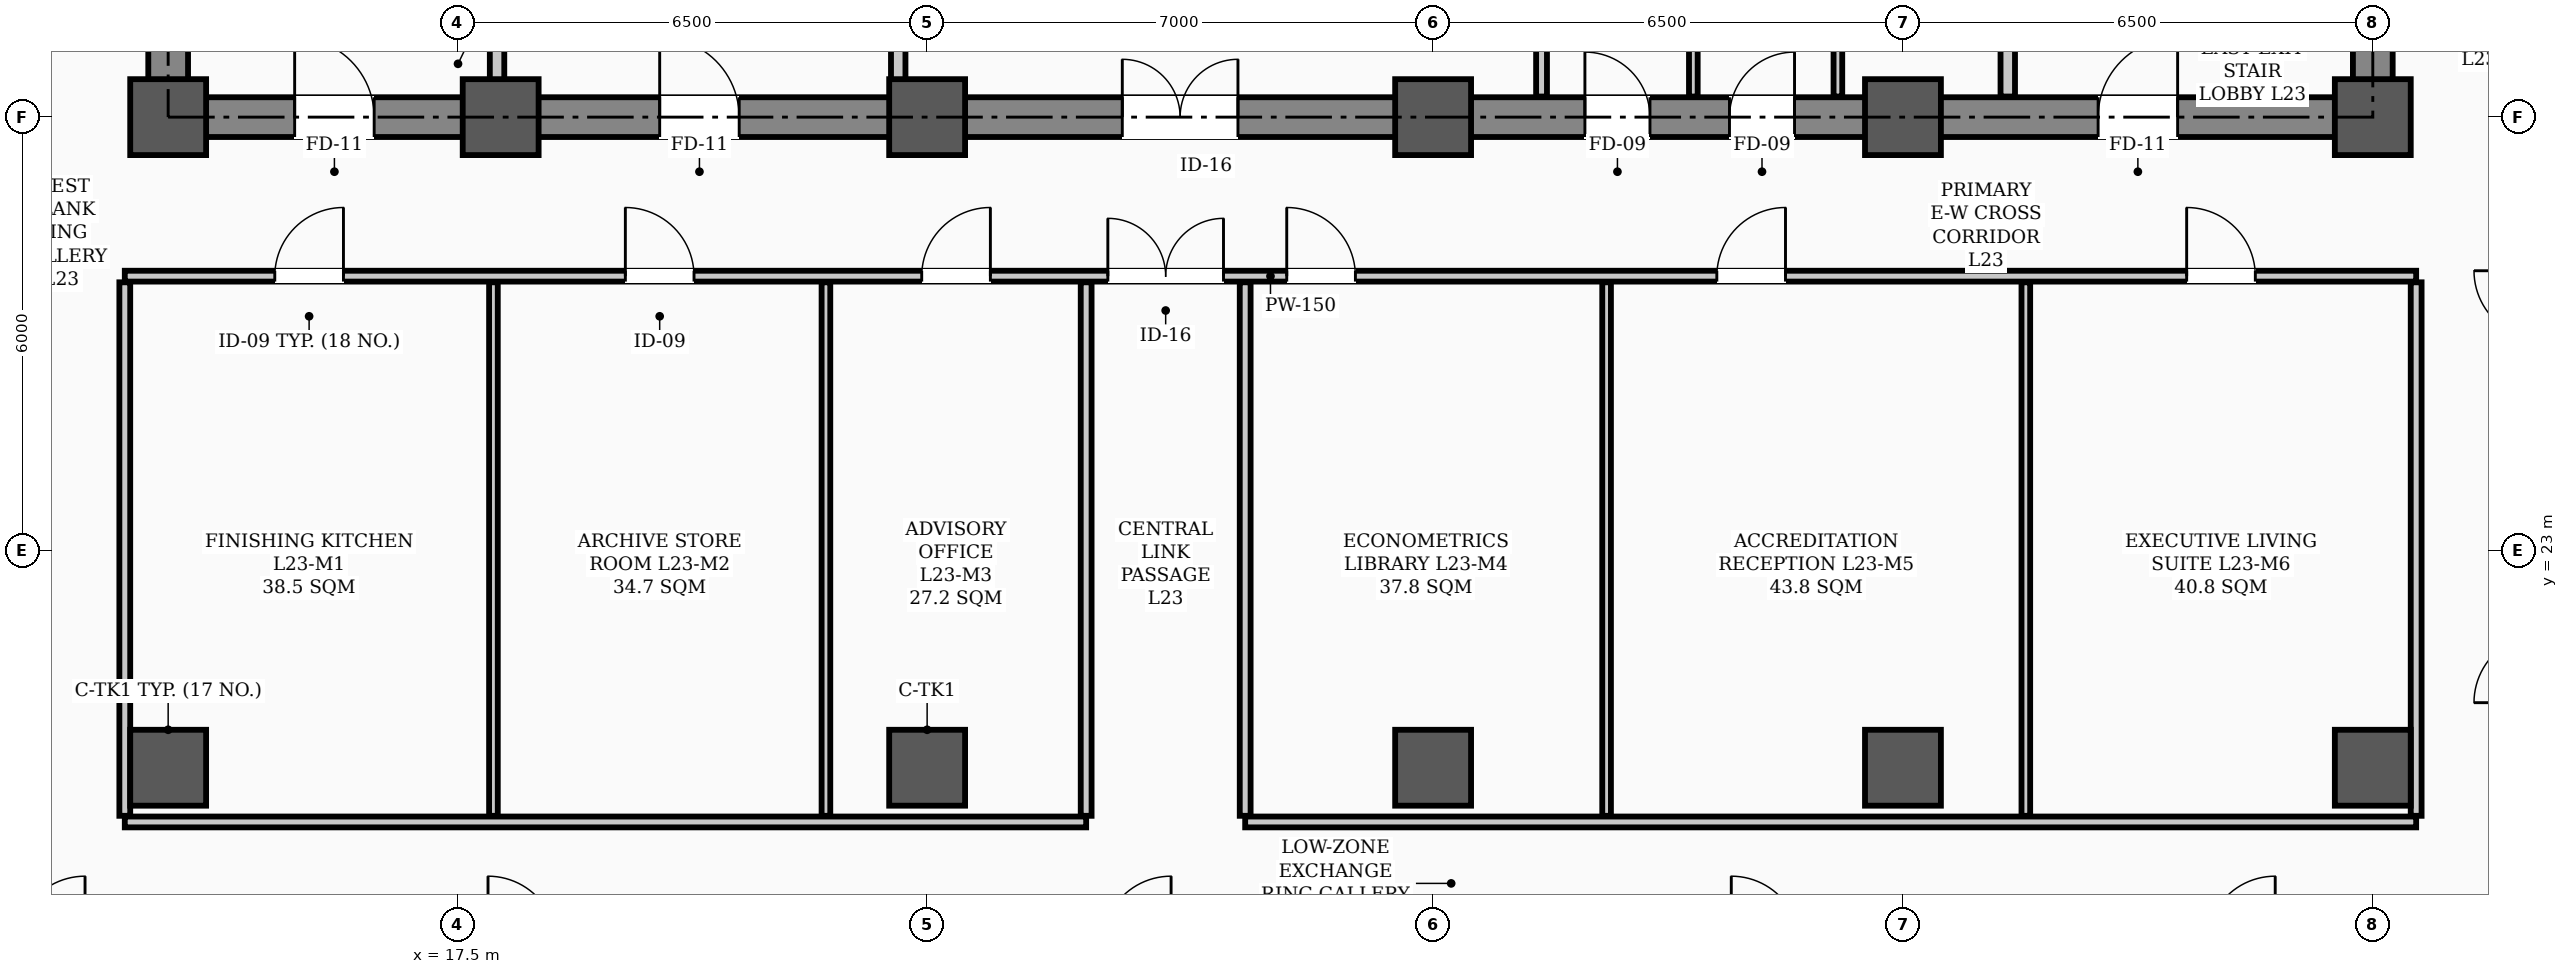
"""IFC4 building model, lengths in metres.
Left out: names, types, materials, properties, quantities, classifications, styles, units other than length and angle.
Written with IfcOpenShell. Run it as: python <this file> out.ifc"""

import sys

from ifc_helpers import new_model, si_unit, direction, frame, frame_2d, origin, origin_2d, place, context, subcontext, project, spatial, rectangle, hollow_rectangle, extrude, element, fill, save


model = new_model("IFC4")
c1 = context("Model", 3, precision=1e-05, world=origin(), true_north=direction((0.0, 1.0)))
c2 = subcontext(c1, "Body", "Model", "MODEL_VIEW")
j1 = project(units=[si_unit("LENGTHUNIT", "METRE"), si_unit("PLANEANGLEUNIT", "RADIAN")], contexts=[c1])
p1 = place(None, origin())
s1 = spatial("IfcSite", under=j1, at=p1, CompositionType="ELEMENT")
p2 = place(p1, origin())
s2 = spatial("IfcBuilding", under=s1, at=p2, CompositionType="ELEMENT")
p3 = place(p2, frame((0.0, 0.0, 92.8)))
s3 = spatial("IfcBuildingStorey", under=s2, at=p3, CompositionType="ELEMENT", Elevation=92.8)
for number, where, z_axis, x_axis in (
    (1, (13.5, 29.0, 0.0), (0.0, 0.0, 1.0), (1.0, 0.0, 0.0)),
    (2, (18.1, 29.0, 0.0), (0.0, 0.0, 1.0), (1.0, 0.0, 0.0)),
    (3, (24.0, 29.0, 0.0), (0.0, 0.0, 1.0), (1.0, 0.0, 0.0)),
    (4, (31.0, 29.0, 0.0), (0.0, 0.0, 1.0), (1.0, 0.0, 0.0)),
    (5, (37.5, 29.0, 0.0), (0.0, 0.0, 1.0), (1.0, 0.0, 0.0)),
    (6, (44.0, 29.0, 0.0), (0.0, 0.0, 1.0), (1.0, 0.0, 0.0)),
    (7, (13.5, 20.0, 0.0), (0.0, 0.0, 1.0), (1.0, 0.0, 0.0)),
    (8, (24.0, 20.0, 0.0), (0.0, 0.0, 1.0), (1.0, 0.0, 0.0)),
    (9, (31.0, 20.0, 0.0), (0.0, 0.0, 1.0), (1.0, 0.0, 0.0)),
    (10, (37.5, 20.0, 0.0), (0.0, 0.0, 1.0), (1.0, 0.0, 0.0)),
    (11, (44.0, 20.0, 0.0), (0.0, 0.0, 1.0), (1.0, 0.0, 0.0)),
):
    element("IfcColumn", number, at=place(p3, frame(where, z_axis=z_axis, x_axis=x_axis)), inside=s3, PredefinedType="COLUMN", context=c2, shape_type="SweptSolid", body=[
        extrude(hollow_rectangle(XDim=1.05, YDim=1.05, WallThickness=0.038, InnerFilletRadius=0.019, OuterFilletRadius=0.057, at=origin_2d()), origin(), (0.0, 0.0, 1.0), 3.9),
    ])
p4 = place(p3, frame((13.5, 29.0, 0.0), z_axis=(0.0, 0.0, 1.0), x_axis=(1.0, 0.0, 0.0)))
e12 = element("IfcWall", 12, at=p4, inside=s3, PredefinedType="SHEAR", context=c2, shape_type="SweptSolid", body=[
    extrude(rectangle(XDim=30.5, YDim=0.55, at=frame_2d((15.25, 0.0))), origin(), (0.0, 0.0, 1.0), 3.72),
])
p5 = place(p4, frame((1.75, 0.0, 0.0)))
e13 = element("IfcOpeningElement", 13, at=p5, cuts=e12, PredefinedType="OPENING", context=c2, shape_type="SweptSolid", body=[
    extrude(rectangle(XDim=1.1, YDim=2.08, at=frame_2d((0.55, 1.04))), frame((0.0, 0.285, 0.0), z_axis=(0.0, -1.0, 0.0), x_axis=(1.0, 0.0, 0.0)), (0.0, 0.0, 1.0), 0.57),
])
p6 = place(p4, frame((26.7, 0.0, 0.0)))
e14 = element("IfcOpeningElement", 14, at=p6, cuts=e12, PredefinedType="OPENING", context=c2, shape_type="SweptSolid", body=[
    extrude(rectangle(XDim=1.1, YDim=2.08, at=frame_2d((0.55, 1.04))), frame((0.0, 0.285, 0.0), z_axis=(0.0, -1.0, 0.0), x_axis=(1.0, 0.0, 0.0)), (0.0, 0.0, 1.0), 0.57),
])
p7 = place(p4, frame((6.8, 0.0, 0.0)))
e15 = element("IfcOpeningElement", 15, at=p7, cuts=e12, PredefinedType="OPENING", context=c2, shape_type="SweptSolid", body=[
    extrude(rectangle(XDim=1.1, YDim=2.08, at=frame_2d((0.55, 1.04))), frame((0.0, 0.285, 0.0), z_axis=(0.0, -1.0, 0.0), x_axis=(1.0, 0.0, 0.0)), (0.0, 0.0, 1.0), 0.57),
])
p8 = place(p4, frame((13.2, 0.0, 0.0)))
e16 = element("IfcOpeningElement", 16, at=p8, cuts=e12, PredefinedType="OPENING", context=c2, shape_type="SweptSolid", body=[
    extrude(rectangle(XDim=1.6, YDim=2.08, at=frame_2d((0.8, 1.04))), frame((0.0, 0.285, 0.0), z_axis=(0.0, -1.0, 0.0), x_axis=(1.0, 0.0, 0.0)), (0.0, 0.0, 1.0), 0.57),
])
p9 = place(p4, frame((19.6, 0.0, 0.0)))
e17 = element("IfcOpeningElement", 17, at=p9, cuts=e12, PredefinedType="OPENING", context=c2, shape_type="SweptSolid", body=[
    extrude(rectangle(XDim=0.9, YDim=2.08, at=frame_2d((0.45, 1.04))), frame((0.0, 0.285, 0.0), z_axis=(0.0, -1.0, 0.0), x_axis=(1.0, 0.0, 0.0)), (0.0, 0.0, 1.0), 0.57),
])
p10 = place(p4, frame((21.6, 0.0, 0.0)))
e18 = element("IfcOpeningElement", 18, at=p10, cuts=e12, PredefinedType="OPENING", context=c2, shape_type="SweptSolid", body=[
    extrude(rectangle(XDim=0.9, YDim=2.08, at=frame_2d((0.45, 1.04))), frame((0.0, 0.285, 0.0), z_axis=(0.0, -1.0, 0.0), x_axis=(1.0, 0.0, 0.0)), (0.0, 0.0, 1.0), 0.57),
])
for number, where, z_axis, x_axis in (
    (19, (13.5, 29.35, 0.0), (0.0, 0.0, 1.0), (0.0, 1.0, 0.0)),
    (20, (44.0, 29.35, 0.0), (0.0, 0.0, 1.0), (0.0, 1.0, 0.0)),
):
    element("IfcWall", number, at=place(p3, frame(where, z_axis=z_axis, x_axis=x_axis)), inside=s3, PredefinedType="SHEAR", context=c2, shape_type="SweptSolid", body=[
        extrude(rectangle(XDim=8.6, YDim=0.55, at=frame_2d((4.3, 0.0))), origin(), (0.0, 0.0, 1.0), 3.72),
    ])
p11 = place(p3, frame((12.9, 26.8, 0.0), z_axis=(0.0, 0.0, 1.0), x_axis=(1.0, 0.0, 0.0)))
e21 = element("IfcWall", 21, at=p11, inside=s3, PredefinedType="PARTITIONING", context=c2, shape_type="SweptSolid", body=[
    extrude(rectangle(XDim=31.7, YDim=0.15, at=frame_2d((15.85, 0.0))), origin(), (0.0, 0.0, 1.0), 3.1),
])
p12 = place(p11, frame((13.6, 0.0, 0.0)))
e22 = element("IfcOpeningElement", 22, at=p12, cuts=e21, PredefinedType="OPENING", context=c2, shape_type="SweptSolid", body=[
    extrude(rectangle(XDim=1.6, YDim=2.08, at=frame_2d((0.8, 1.04))), frame((0.0, 0.085, 0.0), z_axis=(0.0, -1.0, 0.0), x_axis=(1.0, 0.0, 0.0)), (0.0, 0.0, 1.0), 0.17),
])
p13 = place(p11, frame((2.075, 0.0, 0.0)))
e23 = element("IfcOpeningElement", 23, at=p13, cuts=e21, PredefinedType="OPENING", context=c2, shape_type="SweptSolid", body=[
    extrude(rectangle(XDim=0.95, YDim=2.08, at=frame_2d((0.475, 1.04))), frame((0.0, 0.085, 0.0), z_axis=(0.0, -1.0, 0.0), x_axis=(1.0, 0.0, 0.0)), (0.0, 0.0, 1.0), 0.17),
])
p14 = place(p11, frame((6.925, 0.0, 0.0)))
e24 = element("IfcOpeningElement", 24, at=p14, cuts=e21, PredefinedType="OPENING", context=c2, shape_type="SweptSolid", body=[
    extrude(rectangle(XDim=0.95, YDim=2.08, at=frame_2d((0.475, 1.04))), frame((0.0, 0.085, 0.0), z_axis=(0.0, -1.0, 0.0), x_axis=(1.0, 0.0, 0.0)), (0.0, 0.0, 1.0), 0.17),
])
p15 = place(p11, frame((11.025, 0.0, 0.0)))
e25 = element("IfcOpeningElement", 25, at=p15, cuts=e21, PredefinedType="OPENING", context=c2, shape_type="SweptSolid", body=[
    extrude(rectangle(XDim=0.95, YDim=2.08, at=frame_2d((0.475, 1.04))), frame((0.0, 0.085, 0.0), z_axis=(0.0, -1.0, 0.0), x_axis=(1.0, 0.0, 0.0)), (0.0, 0.0, 1.0), 0.17),
])
p16 = place(p11, frame((16.075, 0.0, 0.0)))
e26 = element("IfcOpeningElement", 26, at=p16, cuts=e21, PredefinedType="OPENING", context=c2, shape_type="SweptSolid", body=[
    extrude(rectangle(XDim=0.95, YDim=2.08, at=frame_2d((0.475, 1.04))), frame((0.0, 0.085, 0.0), z_axis=(0.0, -1.0, 0.0), x_axis=(1.0, 0.0, 0.0)), (0.0, 0.0, 1.0), 0.17),
])
p17 = place(p11, frame((22.025, 0.0, 0.0)))
e27 = element("IfcOpeningElement", 27, at=p17, cuts=e21, PredefinedType="OPENING", context=c2, shape_type="SweptSolid", body=[
    extrude(rectangle(XDim=0.95, YDim=2.08, at=frame_2d((0.475, 1.04))), frame((0.0, 0.085, 0.0), z_axis=(0.0, -1.0, 0.0), x_axis=(1.0, 0.0, 0.0)), (0.0, 0.0, 1.0), 0.17),
])
p18 = place(p11, frame((28.525, 0.0, 0.0)))
e28 = element("IfcOpeningElement", 28, at=p18, cuts=e21, PredefinedType="OPENING", context=c2, shape_type="SweptSolid", body=[
    extrude(rectangle(XDim=0.95, YDim=2.08, at=frame_2d((0.475, 1.04))), frame((0.0, 0.085, 0.0), z_axis=(0.0, -1.0, 0.0), x_axis=(1.0, 0.0, 0.0)), (0.0, 0.0, 1.0), 0.17),
])
p19 = place(p3, frame((12.9, 19.25, 0.0), z_axis=(0.0, 0.0, 1.0), x_axis=(1.0, 0.0, 0.0)))
e29 = element("IfcWall", 29, at=p19, inside=s3, PredefinedType="PARTITIONING", context=c2, shape_type="SweptSolid", body=[
    extrude(rectangle(XDim=13.3, YDim=0.15, at=frame_2d((6.65, 0.0))), origin(), (0.0, 0.0, 1.0), 3.1),
])
p20 = place(p3, frame((28.4, 19.25, 0.0), z_axis=(0.0, 0.0, 1.0), x_axis=(1.0, 0.0, 0.0)))
e30 = element("IfcWall", 30, at=p20, inside=s3, PredefinedType="PARTITIONING", context=c2, shape_type="SweptSolid", body=[
    extrude(rectangle(XDim=16.2, YDim=0.15, at=frame_2d((8.1, 0.0))), origin(), (0.0, 0.0, 1.0), 3.1),
])
for number, where, z_axis, x_axis in (
    (31, (18.05, 29.285, 0.0), (0.0, 0.0, 1.0), (0.0, 1.0, 0.0)),
    (32, (38.95, 29.285, 0.0), (0.0, 0.0, 1.0), (0.0, 1.0, 0.0)),
):
    element("IfcWall", number, at=place(p3, frame(where, z_axis=z_axis, x_axis=x_axis)), inside=s3, PredefinedType="STANDARD", context=c2, shape_type="SweptSolid", body=[
        extrude(rectangle(XDim=1.015, YDim=0.2, at=frame_2d((0.508, 0.0))), origin(), (0.0, 0.0, 1.0), 3.3),
    ])
p21 = place(p3, frame((23.6, 29.285, 0.0), z_axis=(0.0, 0.0, 1.0), x_axis=(0.0, 1.0, 0.0)))
e33 = element("IfcWall", 33, at=p21, inside=s3, PredefinedType="STANDARD", context=c2, shape_type="SweptSolid", body=[
    extrude(rectangle(XDim=5.415, YDim=0.2, at=frame_2d((2.708, 0.0))), origin(), (0.0, 0.0, 1.0), 3.1),
])
p22 = place(p3, frame((32.5, 29.285, 0.0), z_axis=(0.0, 0.0, 1.0), x_axis=(0.0, 1.0, 0.0)))
e34 = element("IfcWall", 34, at=p22, inside=s3, PredefinedType="PARTITIONING", context=c2, shape_type="SweptSolid", body=[
    extrude(rectangle(XDim=2.48, YDim=0.15, at=frame_2d((1.24, 0.0))), origin(), (0.0, 0.0, 1.0), 3.3),
])
for number, where, z_axis, x_axis in (
    (35, (36.6, 29.285, 0.0), (0.0, 0.0, 1.0), (0.0, 1.0, 0.0)),
    (36, (34.6, 29.285, 0.0), (0.0, 0.0, 1.0), (0.0, 1.0, 0.0)),
):
    element("IfcWall", number, at=place(p3, frame(where, z_axis=z_axis, x_axis=x_axis)), inside=s3, PredefinedType="PARTITIONING", context=c2, shape_type="SweptSolid", body=[
        extrude(rectangle(XDim=2.48, YDim=0.12, at=frame_2d((1.24, 0.0))), origin(), (0.0, 0.0, 1.0), 3.3),
    ])
for number, where, z_axis, x_axis in (
    (37, (26.2, 19.335, 0.0), (0.0, 0.0, 1.0), (0.0, 1.0, 0.0)),
    (38, (28.4, 19.335, 0.0), (0.0, 0.0, 1.0), (0.0, 1.0, 0.0)),
    (39, (12.9, 19.335, 0.0), (0.0, 0.0, 1.0), (0.0, 1.0, 0.0)),
    (40, (44.6, 19.335, 0.0), (0.0, 0.0, 1.0), (0.0, 1.0, 0.0)),
):
    element("IfcWall", number, at=place(p3, frame(where, z_axis=z_axis, x_axis=x_axis)), inside=s3, PredefinedType="PARTITIONING", context=c2, shape_type="SweptSolid", body=[
        extrude(rectangle(XDim=7.38, YDim=0.15, at=frame_2d((3.69, 0.0))), origin(), (0.0, 0.0, 1.0), 3.0),
    ])
for number, where, z_axis, x_axis in (
    (41, (18.0, 19.335, 0.0), (0.0, 0.0, 1.0), (0.0, 1.0, 0.0)),
    (42, (22.6, 19.335, 0.0), (0.0, 0.0, 1.0), (0.0, 1.0, 0.0)),
    (43, (33.4, 19.335, 0.0), (0.0, 0.0, 1.0), (0.0, 1.0, 0.0)),
    (44, (39.2, 19.335, 0.0), (0.0, 0.0, 1.0), (0.0, 1.0, 0.0)),
):
    element("IfcWall", number, at=place(p3, frame(where, z_axis=z_axis, x_axis=x_axis)), inside=s3, PredefinedType="PARTITIONING", context=c2, shape_type="SweptSolid", body=[
        extrude(rectangle(XDim=7.38, YDim=0.12, at=frame_2d((3.69, 0.0))), origin(), (0.0, 0.0, 1.0), 3.0),
    ])
p23 = place(p5, origin())
e45 = element("IfcDoor", 45, at=p23, inside=s3, OperationType="SINGLE_SWING_LEFT", PredefinedType="DOOR", context=c2, shape_type="SweptSolid", body=[
    extrude(rectangle(XDim=1.1, YDim=2.08, at=frame_2d((0.55, 1.04))), frame((0.0, 0.025, 0.0), z_axis=(0.0, -1.0, 0.0), x_axis=(1.0, 0.0, 0.0)), (0.0, 0.0, 1.0), 0.05),
])
fill(e13, e45)
p24 = place(p6, origin())
e46 = element("IfcDoor", 46, at=p24, inside=s3, OperationType="SINGLE_SWING_RIGHT", PredefinedType="DOOR", context=c2, shape_type="SweptSolid", body=[
    extrude(rectangle(XDim=1.1, YDim=2.08, at=frame_2d((0.55, 1.04))), frame((0.0, 0.025, 0.0), z_axis=(0.0, -1.0, 0.0), x_axis=(1.0, 0.0, 0.0)), (0.0, 0.0, 1.0), 0.05),
])
fill(e14, e46)
p25 = place(p7, origin())
e47 = element("IfcDoor", 47, at=p25, inside=s3, OperationType="SINGLE_SWING_LEFT", PredefinedType="DOOR", context=c2, shape_type="SweptSolid", body=[
    extrude(rectangle(XDim=1.1, YDim=2.08, at=frame_2d((0.55, 1.04))), frame((0.0, 0.025, 0.0), z_axis=(0.0, -1.0, 0.0), x_axis=(1.0, 0.0, 0.0)), (0.0, 0.0, 1.0), 0.05),
])
fill(e15, e47)
p26 = place(p8, origin())
e48 = element("IfcDoor", 48, at=p26, inside=s3, OperationType="DOUBLE_DOOR_SINGLE_SWING", PredefinedType="DOOR", context=c2, shape_type="SweptSolid", body=[
    extrude(rectangle(XDim=1.6, YDim=2.08, at=frame_2d((0.8, 1.04))), frame((0.0, 0.025, 0.0), z_axis=(0.0, -1.0, 0.0), x_axis=(1.0, 0.0, 0.0)), (0.0, 0.0, 1.0), 0.05),
])
fill(e16, e48)
p27 = place(p9, origin())
e49 = element("IfcDoor", 49, at=p27, inside=s3, OperationType="SINGLE_SWING_LEFT", PredefinedType="DOOR", context=c2, shape_type="SweptSolid", body=[
    extrude(rectangle(XDim=0.9, YDim=2.08, at=frame_2d((0.45, 1.04))), frame((0.0, 0.025, 0.0), z_axis=(0.0, -1.0, 0.0), x_axis=(1.0, 0.0, 0.0)), (0.0, 0.0, 1.0), 0.05),
])
fill(e17, e49)
p28 = place(p10, origin())
e50 = element("IfcDoor", 50, at=p28, inside=s3, OperationType="SINGLE_SWING_RIGHT", PredefinedType="DOOR", context=c2, shape_type="SweptSolid", body=[
    extrude(rectangle(XDim=0.9, YDim=2.08, at=frame_2d((0.45, 1.04))), frame((0.0, 0.025, 0.0), z_axis=(0.0, -1.0, 0.0), x_axis=(1.0, 0.0, 0.0)), (0.0, 0.0, 1.0), 0.05),
])
fill(e18, e50)
p29 = place(p12, origin())
e51 = element("IfcDoor", 51, at=p29, inside=s3, OperationType="DOUBLE_DOOR_SINGLE_SWING", PredefinedType="DOOR", context=c2, shape_type="SweptSolid", body=[
    extrude(rectangle(XDim=1.6, YDim=2.08, at=frame_2d((0.8, 1.04))), frame((0.0, 0.025, 0.0), z_axis=(0.0, -1.0, 0.0), x_axis=(1.0, 0.0, 0.0)), (0.0, 0.0, 1.0), 0.05),
])
fill(e22, e51)
p30 = place(p13, origin())
e52 = element("IfcDoor", 52, at=p30, inside=s3, OperationType="SINGLE_SWING_RIGHT", PredefinedType="DOOR", context=c2, shape_type="SweptSolid", body=[
    extrude(rectangle(XDim=0.95, YDim=2.08, at=frame_2d((0.475, 1.04))), frame((0.0, 0.025, 0.0), z_axis=(0.0, -1.0, 0.0), x_axis=(1.0, 0.0, 0.0)), (0.0, 0.0, 1.0), 0.05),
])
fill(e23, e52)
p31 = place(p14, origin())
e53 = element("IfcDoor", 53, at=p31, inside=s3, OperationType="SINGLE_SWING_LEFT", PredefinedType="DOOR", context=c2, shape_type="SweptSolid", body=[
    extrude(rectangle(XDim=0.95, YDim=2.08, at=frame_2d((0.475, 1.04))), frame((0.0, 0.025, 0.0), z_axis=(0.0, -1.0, 0.0), x_axis=(1.0, 0.0, 0.0)), (0.0, 0.0, 1.0), 0.05),
])
fill(e24, e53)
p32 = place(p15, origin())
e54 = element("IfcDoor", 54, at=p32, inside=s3, OperationType="SINGLE_SWING_RIGHT", PredefinedType="DOOR", context=c2, shape_type="SweptSolid", body=[
    extrude(rectangle(XDim=0.95, YDim=2.08, at=frame_2d((0.475, 1.04))), frame((0.0, 0.025, 0.0), z_axis=(0.0, -1.0, 0.0), x_axis=(1.0, 0.0, 0.0)), (0.0, 0.0, 1.0), 0.05),
])
fill(e25, e54)
p33 = place(p16, origin())
e55 = element("IfcDoor", 55, at=p33, inside=s3, OperationType="SINGLE_SWING_LEFT", PredefinedType="DOOR", context=c2, shape_type="SweptSolid", body=[
    extrude(rectangle(XDim=0.95, YDim=2.08, at=frame_2d((0.475, 1.04))), frame((0.0, 0.025, 0.0), z_axis=(0.0, -1.0, 0.0), x_axis=(1.0, 0.0, 0.0)), (0.0, 0.0, 1.0), 0.05),
])
fill(e26, e55)
p34 = place(p17, origin())
e56 = element("IfcDoor", 56, at=p34, inside=s3, OperationType="SINGLE_SWING_RIGHT", PredefinedType="DOOR", context=c2, shape_type="SweptSolid", body=[
    extrude(rectangle(XDim=0.95, YDim=2.08, at=frame_2d((0.475, 1.04))), frame((0.0, 0.025, 0.0), z_axis=(0.0, -1.0, 0.0), x_axis=(1.0, 0.0, 0.0)), (0.0, 0.0, 1.0), 0.05),
])
fill(e27, e56)
p35 = place(p18, origin())
e57 = element("IfcDoor", 57, at=p35, inside=s3, OperationType="SINGLE_SWING_LEFT", PredefinedType="DOOR", context=c2, shape_type="SweptSolid", body=[
    extrude(rectangle(XDim=0.95, YDim=2.08, at=frame_2d((0.475, 1.04))), frame((0.0, 0.025, 0.0), z_axis=(0.0, -1.0, 0.0), x_axis=(1.0, 0.0, 0.0)), (0.0, 0.0, 1.0), 0.05),
])
fill(e28, e57)
save(model, sys.argv[1])
